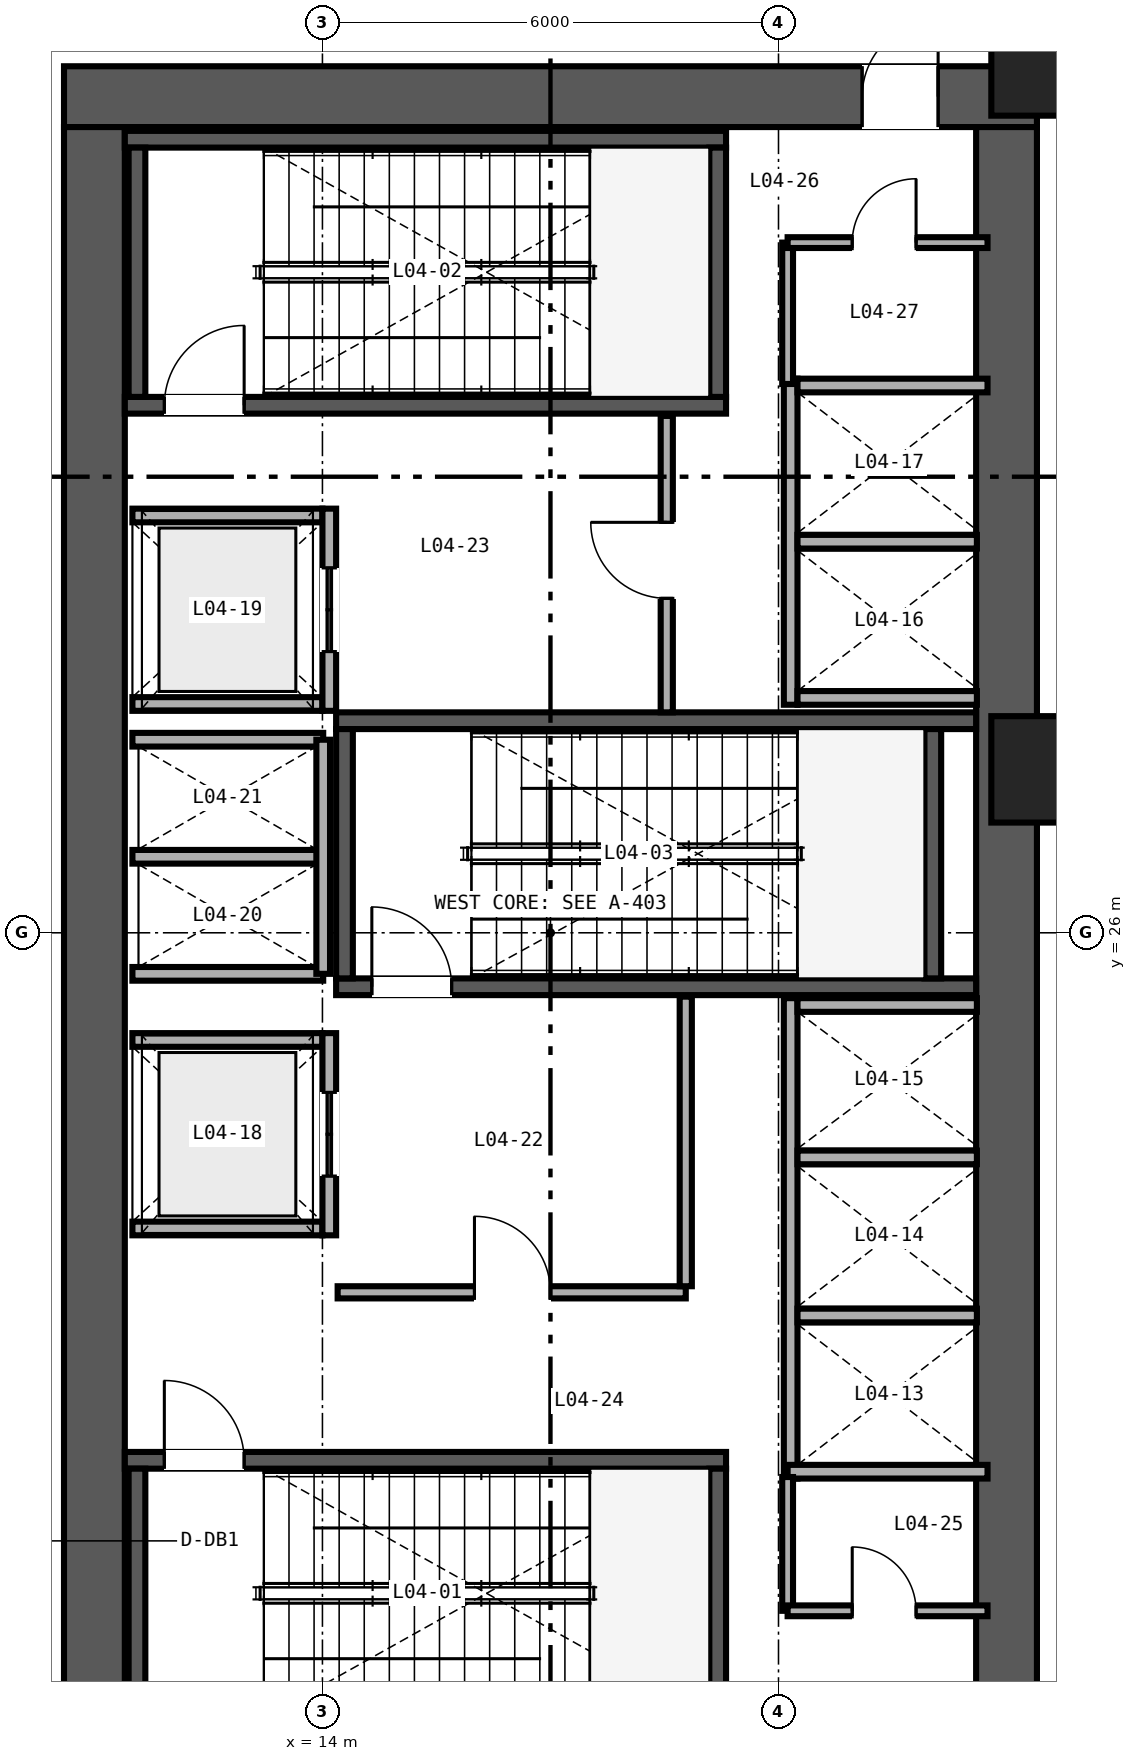
"""IFC4 building model, lengths in metres.
Left out: names, types, materials, properties, quantities, classifications, styles, units other than length and angle.
Written with IfcOpenShell. Run it as: python <this file> out.ifc"""

import sys

from ifc_helpers import new_model, si_unit, direction, frame, frame_2d, origin, origin_2d, place, context, subcontext, project, spatial, rectangle, extrude, source, transform, mapped, element, fill, save


model = new_model("IFC4")
c1 = context("Model", 3, precision=1e-05, world=origin(), true_north=direction((0.0, 1.0)))
c2 = subcontext(c1, "Body", "Model", "MODEL_VIEW")
j1 = project(units=[si_unit("LENGTHUNIT", "METRE"), si_unit("PLANEANGLEUNIT", "RADIAN")], contexts=[c1])
p1 = place(None, origin())
s1 = spatial("IfcSite", under=j1, at=p1, CompositionType="ELEMENT")
p2 = place(p1, origin())
s2 = spatial("IfcBuilding", under=s1, at=p2, CompositionType="ELEMENT")
p3 = place(p2, frame((0.0, 0.0, 19.2)))
s3 = spatial("IfcBuildingStorey", under=s2, at=p3, CompositionType="ELEMENT", Elevation=19.2)
p4 = place(p3, frame((10.6, 37.0, 0.0), z_axis=(0.0, 0.0, 1.0), x_axis=(1.0, 0.0, 0.0)))
e1 = element("IfcWall", 1, at=p4, inside=s3, PredefinedType="SHEAR", context=c2, shape_type="SweptSolid", body=[
    extrude(rectangle(XDim=12.8, YDim=0.8, at=frame_2d((6.4, 0.0))), origin(), (0.0, 0.0, 1.0), 4.48),
])
p5 = place(p4, frame((10.5, 0.0, 0.0)))
e2 = element("IfcOpeningElement", 2, at=p5, cuts=e1, PredefinedType="OPENING", context=c2, shape_type="SweptSolid", body=[
    extrude(rectangle(XDim=1.0, YDim=2.15, at=frame_2d((0.5, 1.075))), frame((0.0, 0.41, 0.0), z_axis=(0.0, -1.0, 0.0), x_axis=(1.0, 0.0, 0.0)), (0.0, 0.0, 1.0), 0.82),
])
for number, where, z_axis, x_axis in (
    (3, (11.0, 15.4, 0.0), (0.0, 0.0, 1.0), (0.0, 1.0, 0.0)),
    (4, (23.0, 15.4, 0.0), (0.0, 0.0, 1.0), (0.0, 1.0, 0.0)),
):
    element("IfcWall", number, at=place(p3, frame(where, z_axis=z_axis, x_axis=x_axis)), inside=s3, PredefinedType="SHEAR", context=c2, shape_type="SweptSolid", body=[
        extrude(rectangle(XDim=21.2, YDim=0.8, at=frame_2d((10.6, 0.0))), origin(), (0.0, 0.0, 1.0), 4.48),
    ])
p6 = place(p3, frame((11.4, 19.06, 0.0), z_axis=(0.0, 0.0, 1.0), x_axis=(1.0, 0.0, 0.0)))
e5 = element("IfcWall", 5, at=p6, inside=s3, PredefinedType="SHEAR", context=c2, shape_type="SweptSolid", body=[
    extrude(rectangle(XDim=7.91, YDim=0.22, at=frame_2d((3.955, 0.0))), origin(), (0.0, 0.0, 1.0), 4.6),
])
p7 = place(p6, frame((0.52, 0.0, 0.0)))
e6 = element("IfcOpeningElement", 6, at=p7, cuts=e5, PredefinedType="OPENING", context=c2, shape_type="SweptSolid", body=[
    extrude(rectangle(XDim=1.05, YDim=2.15, at=frame_2d((0.525, 1.075))), frame((0.0, 0.12, 0.0), z_axis=(0.0, -1.0, 0.0), x_axis=(1.0, 0.0, 0.0)), (0.0, 0.0, 1.0), 0.24),
])
for number, where, z_axis, x_axis in (
    (7, (11.56, 15.67, 0.0), (0.0, 0.0, 1.0), (0.0, 1.0, 0.0)),
    (8, (19.2, 15.67, 0.0), (0.0, 0.0, 1.0), (0.0, 1.0, 0.0)),
):
    element("IfcWall", number, at=place(p3, frame(where, z_axis=z_axis, x_axis=x_axis)), inside=s3, PredefinedType="SHEAR", context=c2, shape_type="SweptSolid", body=[
        extrude(rectangle(XDim=3.28, YDim=0.22, at=frame_2d((1.64, 0.0))), origin(), (0.0, 0.0, 1.0), 4.6),
    ])
p8 = place(p3, frame((11.4, 32.94, 0.0), z_axis=(0.0, 0.0, 1.0), x_axis=(1.0, 0.0, 0.0)))
e9 = element("IfcWall", 9, at=p8, inside=s3, PredefinedType="SHEAR", context=c2, shape_type="SweptSolid", body=[
    extrude(rectangle(XDim=7.91, YDim=0.22, at=frame_2d((3.955, 0.0))), origin(), (0.0, 0.0, 1.0), 4.6),
])
p9 = place(p8, frame((0.52, 0.0, 0.0)))
e10 = element("IfcOpeningElement", 10, at=p9, cuts=e9, PredefinedType="OPENING", context=c2, shape_type="SweptSolid", body=[
    extrude(rectangle(XDim=1.05, YDim=2.15, at=frame_2d((0.525, 1.075))), frame((0.0, 0.12, 0.0), z_axis=(0.0, -1.0, 0.0), x_axis=(1.0, 0.0, 0.0)), (0.0, 0.0, 1.0), 0.24),
])
p10 = place(p3, frame((11.4, 36.44, 0.0), z_axis=(0.0, 0.0, 1.0), x_axis=(1.0, 0.0, 0.0)))
e11 = element("IfcWall", 11, at=p10, inside=s3, PredefinedType="SHEAR", context=c2, shape_type="SweptSolid", body=[
    extrude(rectangle(XDim=7.91, YDim=0.22, at=frame_2d((3.955, 0.0))), origin(), (0.0, 0.0, 1.0), 4.6),
])
for number, where, z_axis, x_axis in (
    (12, (11.56, 33.05, 0.0), (0.0, 0.0, 1.0), (0.0, 1.0, 0.0)),
    (13, (19.2, 33.05, 0.0), (0.0, 0.0, 1.0), (0.0, 1.0, 0.0)),
):
    element("IfcWall", number, at=place(p3, frame(where, z_axis=z_axis, x_axis=x_axis)), inside=s3, PredefinedType="SHEAR", context=c2, shape_type="SweptSolid", body=[
        extrude(rectangle(XDim=3.28, YDim=0.22, at=frame_2d((1.64, 0.0))), origin(), (0.0, 0.0, 1.0), 4.6),
    ])
p11 = place(p3, frame((14.18, 25.29, 0.0), z_axis=(0.0, 0.0, 1.0), x_axis=(1.0, 0.0, 0.0)))
e14 = element("IfcWall", 14, at=p11, inside=s3, PredefinedType="SHEAR", context=c2, shape_type="SweptSolid", body=[
    extrude(rectangle(XDim=8.42, YDim=0.22, at=frame_2d((4.21, 0.0))), origin(), (0.0, 0.0, 1.0), 4.6),
])
p12 = place(p11, frame((0.47, 0.0, 0.0)))
e15 = element("IfcOpeningElement", 15, at=p12, cuts=e14, PredefinedType="OPENING", context=c2, shape_type="SweptSolid", body=[
    extrude(rectangle(XDim=1.05, YDim=2.15, at=frame_2d((0.525, 1.075))), frame((0.0, 0.12, 0.0), z_axis=(0.0, -1.0, 0.0), x_axis=(1.0, 0.0, 0.0)), (0.0, 0.0, 1.0), 0.24),
])
p13 = place(p3, frame((14.18, 28.79, 0.0), z_axis=(0.0, 0.0, 1.0), x_axis=(1.0, 0.0, 0.0)))
e16 = element("IfcWall", 16, at=p13, inside=s3, PredefinedType="SHEAR", context=c2, shape_type="SweptSolid", body=[
    extrude(rectangle(XDim=8.42, YDim=0.22, at=frame_2d((4.21, 0.0))), origin(), (0.0, 0.0, 1.0), 4.6),
])
for number, where, z_axis, x_axis in (
    (17, (14.29, 25.4, 0.0), (0.0, 0.0, 1.0), (0.0, 1.0, 0.0)),
    (18, (22.03, 25.4, 0.0), (0.0, 0.0, 1.0), (0.0, 1.0, 0.0)),
):
    element("IfcWall", number, at=place(p3, frame(where, z_axis=z_axis, x_axis=x_axis)), inside=s3, PredefinedType="SHEAR", context=c2, shape_type="SweptSolid", body=[
        extrude(rectangle(XDim=3.28, YDim=0.22, at=frame_2d((1.64, 0.0))), origin(), (0.0, 0.0, 1.0), 4.6),
    ])
m1 = source(origin(), c2, "Body", "SweptSolid", [
    extrude(rectangle(XDim=1.4, YDim=1.4, at=origin_2d()), origin(), (0.0, 0.0, 1.0), 4.48),
])
for number, where, z_axis, x_axis in (
    (19, (23.5, 28.15, 0.0), (0.0, 0.0, 1.0), (1.0, 0.0, 0.0)),
    (20, (23.5, 37.45, 0.0), (0.0, 0.0, 1.0), (1.0, 0.0, 0.0)),
):
    element("IfcColumn", number, at=place(p3, frame(where, z_axis=z_axis, x_axis=x_axis)), inside=s3, PredefinedType="COLUMN", context=c2, shape_type="MappedRepresentation", body=[
        mapped(m1, transform((0.0, 0.0, 0.0), scale=1.0)),
    ])
p14 = place(p3, frame((20.16, 18.82, 0.0), z_axis=(0.0, 0.0, 1.0), x_axis=(0.0, 1.0, 0.0)))
e21 = element("IfcWall", 21, at=p14, inside=s3, PredefinedType="SOLIDWALL", context=c2, shape_type="SweptSolid", body=[
    extrude(rectangle(XDim=6.32, YDim=0.18, at=frame_2d((3.16, 0.0))), origin(), (0.0, 0.0, 1.0), 3.38),
])
p15 = place(p3, frame((20.12, 18.91, 0.0), z_axis=(0.0, 0.0, 1.0), x_axis=(1.0, 0.0, 0.0)))
e22 = element("IfcWall", 22, at=p15, inside=s3, PredefinedType="SOLIDWALL", context=c2, shape_type="SweptSolid", body=[
    extrude(rectangle(XDim=2.63, YDim=0.18, at=frame_2d((1.315, 0.0))), origin(), (0.0, 0.0, 1.0), 4.48),
])
p16 = place(p3, frame((20.25, 25.05, 0.0), z_axis=(0.0, 0.0, 1.0), x_axis=(1.0, 0.0, 0.0)))
e23 = element("IfcWall", 23, at=p16, inside=s3, PredefinedType="SOLIDWALL", context=c2, shape_type="SweptSolid", body=[
    extrude(rectangle(XDim=2.36, YDim=0.18, at=frame_2d((1.18, 0.0))), origin(), (0.0, 0.0, 1.0), 4.48),
])
p17 = place(p3, frame((20.25, 20.965, 0.0), z_axis=(0.0, 0.0, 1.0), x_axis=(1.0, 0.0, 0.0)))
e24 = element("IfcWall", 24, at=p17, inside=s3, PredefinedType="SOLIDWALL", context=c2, shape_type="SweptSolid", body=[
    extrude(rectangle(XDim=2.36, YDim=0.18, at=frame_2d((1.18, 0.0))), origin(), (0.0, 0.0, 1.0), 3.38),
])
p18 = place(p3, frame((20.25, 23.045, 0.0), z_axis=(0.0, 0.0, 1.0), x_axis=(1.0, 0.0, 0.0)))
e25 = element("IfcWall", 25, at=p18, inside=s3, PredefinedType="SOLIDWALL", context=c2, shape_type="SweptSolid", body=[
    extrude(rectangle(XDim=2.36, YDim=0.18, at=frame_2d((1.18, 0.0))), origin(), (0.0, 0.0, 1.0), 4.48),
])
p19 = place(p3, frame((20.16, 29.0, 0.0), z_axis=(0.0, 0.0, 1.0), x_axis=(0.0, 1.0, 0.0)))
e26 = element("IfcWall", 26, at=p19, inside=s3, PredefinedType="SOLIDWALL", context=c2, shape_type="SweptSolid", body=[
    extrude(rectangle(XDim=4.29, YDim=0.18, at=frame_2d((2.145, 0.0))), origin(), (0.0, 0.0, 1.0), 4.48),
])
p20 = place(p3, frame((20.25, 29.09, 0.0), z_axis=(0.0, 0.0, 1.0), x_axis=(1.0, 0.0, 0.0)))
e27 = element("IfcWall", 27, at=p20, inside=s3, PredefinedType="SOLIDWALL", context=c2, shape_type="SweptSolid", body=[
    extrude(rectangle(XDim=2.36, YDim=0.18, at=frame_2d((1.18, 0.0))), origin(), (0.0, 0.0, 1.0), 4.48),
])
p21 = place(p3, frame((20.25, 33.2, 0.0), z_axis=(0.0, 0.0, 1.0), x_axis=(1.0, 0.0, 0.0)))
e28 = element("IfcWall", 28, at=p21, inside=s3, PredefinedType="SOLIDWALL", context=c2, shape_type="SweptSolid", body=[
    extrude(rectangle(XDim=2.5, YDim=0.18, at=frame_2d((1.25, 0.0))), origin(), (0.0, 0.0, 1.0), 4.48),
])
p22 = place(p3, frame((20.25, 31.145, 0.0), z_axis=(0.0, 0.0, 1.0), x_axis=(1.0, 0.0, 0.0)))
e29 = element("IfcWall", 29, at=p22, inside=s3, PredefinedType="SOLIDWALL", context=c2, shape_type="SweptSolid", body=[
    extrude(rectangle(XDim=2.36, YDim=0.18, at=frame_2d((1.18, 0.0))), origin(), (0.0, 0.0, 1.0), 4.48),
])
for number, where, z_axis, x_axis in (
    (30, (11.5, 22.11, 0.0), (0.0, 0.0, 1.0), (1.0, 0.0, 0.0)),
    (31, (11.5, 24.59, 0.0), (0.0, 0.0, 1.0), (1.0, 0.0, 0.0)),
):
    element("IfcWall", number, at=place(p3, frame(where, z_axis=z_axis, x_axis=x_axis)), inside=s3, PredefinedType="SOLIDWALL", context=c2, shape_type="SweptSolid", body=[
        extrude(rectangle(XDim=2.5, YDim=0.18, at=frame_2d((1.25, 0.0))), origin(), (0.0, 0.0, 1.0), 4.48),
    ])
p23 = place(p3, frame((14.09, 22.02, 0.0), z_axis=(0.0, 0.0, 1.0), x_axis=(0.0, 1.0, 0.0)))
e32 = element("IfcWall", 32, at=p23, inside=s3, PredefinedType="SOLIDWALL", context=c2, shape_type="SweptSolid", body=[
    extrude(rectangle(XDim=2.66, YDim=0.18, at=frame_2d((1.33, 0.0))), origin(), (0.0, 0.0, 1.0), 4.48),
])
p24 = place(p23, frame((0.78, 0.0, 0.0)))
e33 = element("IfcOpeningElement", 33, at=p24, cuts=e32, PredefinedType="OPENING", context=c2, shape_type="SweptSolid", body=[
    extrude(rectangle(XDim=1.1, YDim=2.2, at=frame_2d((0.55, 1.1))), frame((0.0, 0.1, 0.0), z_axis=(0.0, -1.0, 0.0), x_axis=(1.0, 0.0, 0.0)), (0.0, 0.0, 1.0), 0.2),
])
for number, where, z_axis, x_axis in (
    (34, (11.5, 29.01, 0.0), (0.0, 0.0, 1.0), (1.0, 0.0, 0.0)),
    (35, (11.5, 31.49, 0.0), (0.0, 0.0, 1.0), (1.0, 0.0, 0.0)),
):
    element("IfcWall", number, at=place(p3, frame(where, z_axis=z_axis, x_axis=x_axis)), inside=s3, PredefinedType="SOLIDWALL", context=c2, shape_type="SweptSolid", body=[
        extrude(rectangle(XDim=2.5, YDim=0.18, at=frame_2d((1.25, 0.0))), origin(), (0.0, 0.0, 1.0), 4.48),
    ])
p25 = place(p3, frame((14.09, 28.92, 0.0), z_axis=(0.0, 0.0, 1.0), x_axis=(0.0, 1.0, 0.0)))
e36 = element("IfcWall", 36, at=p25, inside=s3, PredefinedType="SOLIDWALL", context=c2, shape_type="SweptSolid", body=[
    extrude(rectangle(XDim=2.66, YDim=0.18, at=frame_2d((1.33, 0.0))), origin(), (0.0, 0.0, 1.0), 4.48),
])
p26 = place(p25, frame((0.78, 0.0, 0.0)))
e37 = element("IfcOpeningElement", 37, at=p26, cuts=e36, PredefinedType="OPENING", context=c2, shape_type="SweptSolid", body=[
    extrude(rectangle(XDim=1.1, YDim=2.2, at=frame_2d((0.55, 1.1))), frame((0.0, 0.1, 0.0), z_axis=(0.0, -1.0, 0.0), x_axis=(1.0, 0.0, 0.0)), (0.0, 0.0, 1.0), 0.2),
])
for number, where, z_axis, x_axis in (
    (38, (11.5, 25.46, 0.0), (0.0, 0.0, 1.0), (1.0, 0.0, 0.0)),
    (39, (11.5, 27.0, 0.0), (0.0, 0.0, 1.0), (1.0, 0.0, 0.0)),
    (40, (11.5, 28.54, 0.0), (0.0, 0.0, 1.0), (1.0, 0.0, 0.0)),
):
    element("IfcWall", number, at=place(p3, frame(where, z_axis=z_axis, x_axis=x_axis)), inside=s3, PredefinedType="SOLIDWALL", context=c2, shape_type="SweptSolid", body=[
        extrude(rectangle(XDim=2.51, YDim=0.18, at=frame_2d((1.255, 0.0))), origin(), (0.0, 0.0, 1.0), 4.48),
    ])
p27 = place(p3, frame((14.01, 25.46, 0.0), z_axis=(0.0, 0.0, 1.0), x_axis=(0.0, 1.0, 0.0)))
e41 = element("IfcWall", 41, at=p27, inside=s3, PredefinedType="SOLIDWALL", context=c2, shape_type="SweptSolid", body=[
    extrude(rectangle(XDim=3.08, YDim=0.18, at=frame_2d((1.54, 0.0))), origin(), (0.0, 0.0, 1.0), 4.48),
])
p28 = place(p3, frame((14.2, 21.27, 0.0), z_axis=(0.0, 0.0, 1.0), x_axis=(1.0, 0.0, 0.0)))
e42 = element("IfcWall", 42, at=p28, inside=s3, PredefinedType="PARTITIONING", context=c2, shape_type="SweptSolid", body=[
    extrude(rectangle(XDim=4.58, YDim=0.16, at=frame_2d((2.29, 0.0))), origin(), (0.0, 0.0, 1.0), 4.48),
])
p29 = place(p28, frame((1.8, 0.0, 0.0)))
e43 = element("IfcOpeningElement", 43, at=p29, cuts=e42, PredefinedType="OPENING", context=c2, shape_type="SweptSolid", body=[
    extrude(rectangle(XDim=1.0, YDim=2.15, at=frame_2d((0.5, 1.075))), frame((0.0, 0.09, 0.0), z_axis=(0.0, -1.0, 0.0), x_axis=(1.0, 0.0, 0.0)), (0.0, 0.0, 1.0), 0.18),
])
p30 = place(p3, frame((18.78, 21.35, 0.0), z_axis=(0.0, 0.0, 1.0), x_axis=(0.0, 1.0, 0.0)))
e44 = element("IfcWall", 44, at=p30, inside=s3, PredefinedType="PARTITIONING", context=c2, shape_type="SweptSolid", body=[
    extrude(rectangle(XDim=3.81, YDim=0.16, at=frame_2d((1.905, 0.0))), origin(), (0.0, 0.0, 1.0), 4.48),
])
p31 = place(p3, frame((18.53, 28.9, 0.0), z_axis=(0.0, 0.0, 1.0), x_axis=(0.0, 1.0, 0.0)))
e45 = element("IfcWall", 45, at=p31, inside=s3, PredefinedType="PARTITIONING", context=c2, shape_type="SweptSolid", body=[
    extrude(rectangle(XDim=3.9, YDim=0.16, at=frame_2d((1.95, 0.0))), origin(), (0.0, 0.0, 1.0), 4.48),
])
p32 = place(p31, frame((1.5, 0.0, 0.0)))
e46 = element("IfcOpeningElement", 46, at=p32, cuts=e45, PredefinedType="OPENING", context=c2, shape_type="SweptSolid", body=[
    extrude(rectangle(XDim=1.0, YDim=2.15, at=frame_2d((0.5, 1.075))), frame((0.0, 0.09, 0.0), z_axis=(0.0, -1.0, 0.0), x_axis=(1.0, 0.0, 0.0)), (0.0, 0.0, 1.0), 0.18),
])
p33 = place(p3, frame((20.12, 17.08, 0.0), z_axis=(0.0, 0.0, 1.0), x_axis=(0.0, 1.0, 0.0)))
e47 = element("IfcWall", 47, at=p33, inside=s3, PredefinedType="PARTITIONING", context=c2, shape_type="SweptSolid", body=[
    extrude(rectangle(XDim=1.76, YDim=0.142, at=frame_2d((0.88, 0.0))), origin(), (0.0, 0.0, 1.0), 4.48),
])
p34 = place(p3, frame((20.12, 17.08, 0.0), z_axis=(0.0, 0.0, 1.0), x_axis=(1.0, 0.0, 0.0)))
e48 = element("IfcWall", 48, at=p34, inside=s3, PredefinedType="PARTITIONING", context=c2, shape_type="SweptSolid", body=[
    extrude(rectangle(XDim=2.63, YDim=0.142, at=frame_2d((1.315, 0.0))), origin(), (0.0, 0.0, 1.0), 4.48),
])
p35 = place(p34, frame((0.85, 0.0, 0.0)))
e49 = element("IfcOpeningElement", 49, at=p35, cuts=e48, PredefinedType="OPENING", context=c2, shape_type="SweptSolid", body=[
    extrude(rectangle(XDim=0.84, YDim=2.1, at=frame_2d((0.42, 1.05))), frame((0.0, 0.081, 0.0), z_axis=(0.0, -1.0, 0.0), x_axis=(1.0, 0.0, 0.0)), (0.0, 0.0, 1.0), 0.162),
])
p36 = place(p3, frame((20.12, 33.22, 0.0), z_axis=(0.0, 0.0, 1.0), x_axis=(0.0, 1.0, 0.0)))
e50 = element("IfcWall", 50, at=p36, inside=s3, PredefinedType="PARTITIONING", context=c2, shape_type="SweptSolid", body=[
    extrude(rectangle(XDim=1.86, YDim=0.142, at=frame_2d((0.93, 0.0))), origin(), (0.0, 0.0, 1.0), 4.48),
])
p37 = place(p3, frame((20.12, 35.08, 0.0), z_axis=(0.0, 0.0, 1.0), x_axis=(1.0, 0.0, 0.0)))
e51 = element("IfcWall", 51, at=p37, inside=s3, PredefinedType="PARTITIONING", context=c2, shape_type="SweptSolid", body=[
    extrude(rectangle(XDim=2.63, YDim=0.142, at=frame_2d((1.315, 0.0))), origin(), (0.0, 0.0, 1.0), 4.48),
])
p38 = place(p37, frame((0.85, 0.0, 0.0)))
e52 = element("IfcOpeningElement", 52, at=p38, cuts=e51, PredefinedType="OPENING", context=c2, shape_type="SweptSolid", body=[
    extrude(rectangle(XDim=0.84, YDim=2.1, at=frame_2d((0.42, 1.05))), frame((0.0, 0.081, 0.0), z_axis=(0.0, -1.0, 0.0), x_axis=(1.0, 0.0, 0.0)), (0.0, 0.0, 1.0), 0.162),
])
m2 = source(origin(), c2, "Body", "SweptSolid", [
    extrude(rectangle(XDim=1.05, YDim=2.15, at=frame_2d((0.525, 1.075))), frame((0.0, 0.025, 0.0), z_axis=(0.0, -1.0, 0.0), x_axis=(1.0, 0.0, 0.0)), (0.0, 0.0, 1.0), 0.05),
])
p39 = place(p7, origin())
e53 = element("IfcDoor", 53, at=p39, inside=s3, OperationType="SINGLE_SWING_LEFT", PredefinedType="DOOR", context=c2, shape_type="MappedRepresentation", body=[
    mapped(m2, transform((0.0, 0.0, 0.0), scale=1.0)),
])
fill(e6, e53)
p40 = place(p9, origin())
e54 = element("IfcDoor", 54, at=p40, inside=s3, OperationType="SINGLE_SWING_RIGHT", PredefinedType="DOOR", context=c2, shape_type="MappedRepresentation", body=[
    mapped(m2, transform((0.0, 0.0, 0.0), scale=1.0)),
])
fill(e10, e54)
p41 = place(p12, origin())
e55 = element("IfcDoor", 55, at=p41, inside=s3, OperationType="SINGLE_SWING_LEFT", PredefinedType="DOOR", context=c2, shape_type="MappedRepresentation", body=[
    mapped(m2, transform((0.0, 0.0, 0.0), scale=1.0)),
])
fill(e15, e55)
m3 = source(origin(), c2, "Body", "SweptSolid", [
    extrude(rectangle(XDim=1.1, YDim=2.2, at=frame_2d((0.55, 1.1))), frame((0.0, 0.025, 0.0), z_axis=(0.0, -1.0, 0.0), x_axis=(1.0, 0.0, 0.0)), (0.0, 0.0, 1.0), 0.05),
])
p42 = place(p24, origin())
e56 = element("IfcDoor", 56, at=p42, inside=s3, OperationType="DOUBLE_DOOR_SLIDING", PredefinedType="DOOR", context=c2, shape_type="MappedRepresentation", body=[
    mapped(m3, transform((0.0, 0.0, 0.0), scale=1.0)),
])
fill(e33, e56)
p43 = place(p26, origin())
e57 = element("IfcDoor", 57, at=p43, inside=s3, OperationType="DOUBLE_DOOR_SLIDING", PredefinedType="DOOR", context=c2, shape_type="MappedRepresentation", body=[
    mapped(m3, transform((0.0, 0.0, 0.0), scale=1.0)),
])
fill(e37, e57)
m4 = source(origin(), c2, "Body", "SweptSolid", [
    extrude(rectangle(XDim=1.0, YDim=2.15, at=frame_2d((0.5, 1.075))), frame((0.0, 0.025, 0.0), z_axis=(0.0, -1.0, 0.0), x_axis=(1.0, 0.0, 0.0)), (0.0, 0.0, 1.0), 0.05),
])
p44 = place(p29, origin())
e58 = element("IfcDoor", 58, at=p44, inside=s3, OperationType="SINGLE_SWING_LEFT", PredefinedType="DOOR", context=c2, shape_type="MappedRepresentation", body=[
    mapped(m4, transform((0.0, 0.0, 0.0), scale=1.0)),
])
fill(e43, e58)
p45 = place(p32, origin())
e59 = element("IfcDoor", 59, at=p45, inside=s3, OperationType="SINGLE_SWING_RIGHT", PredefinedType="DOOR", context=c2, shape_type="MappedRepresentation", body=[
    mapped(m4, transform((0.0, 0.0, 0.0), scale=1.0)),
])
fill(e46, e59)
m5 = source(origin(), c2, "Body", "SweptSolid", [
    extrude(rectangle(XDim=0.84, YDim=2.1, at=frame_2d((0.42, 1.05))), frame((0.0, 0.025, 0.0), z_axis=(0.0, -1.0, 0.0), x_axis=(1.0, 0.0, 0.0)), (0.0, 0.0, 1.0), 0.05),
])
p46 = place(p35, origin())
e60 = element("IfcDoor", 60, at=p46, inside=s3, OperationType="SINGLE_SWING_LEFT", PredefinedType="DOOR", context=c2, shape_type="MappedRepresentation", body=[
    mapped(m5, transform((0.0, 0.0, 0.0), scale=1.0)),
])
fill(e49, e60)
p47 = place(p38, origin())
e61 = element("IfcDoor", 61, at=p47, inside=s3, OperationType="SINGLE_SWING_RIGHT", PredefinedType="DOOR", context=c2, shape_type="MappedRepresentation", body=[
    mapped(m5, transform((0.0, 0.0, 0.0), scale=1.0)),
])
fill(e52, e61)
p48 = place(p5, origin())
e62 = element("IfcDoor", 62, at=p48, inside=s3, OperationType="SINGLE_SWING_RIGHT", PredefinedType="DOOR", context=c2, shape_type="MappedRepresentation", body=[
    mapped(m4, transform((0.0, 0.0, 0.0), scale=1.0)),
])
fill(e2, e62)
save(model, sys.argv[1])
